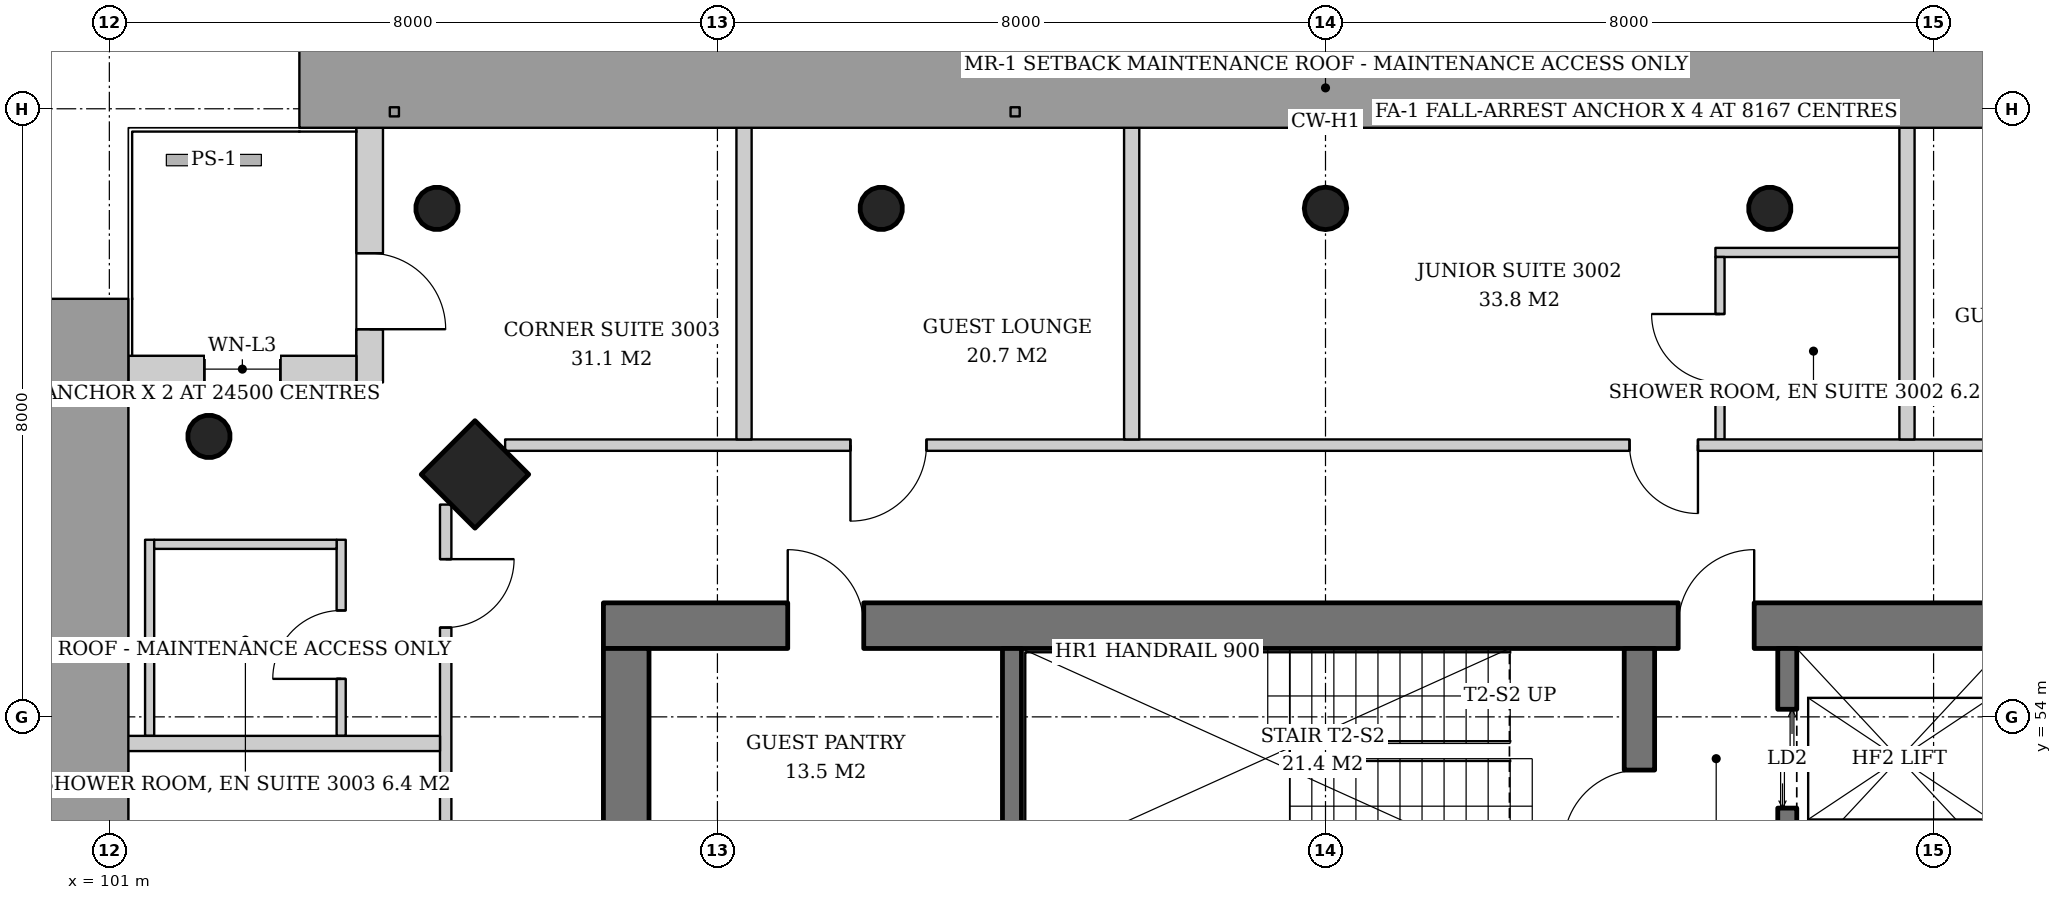
"""IFC4 building model, lengths in metres.
Left out: names, types, materials, properties, quantities, classifications, styles, units other than length and angle.
Written with IfcOpenShell. Run it as: python <this file> out.ifc"""

import sys

from ifc_helpers import new_model, si_unit, direction, frame, frame_2d, origin, origin_2d, place, context, subcontext, project, spatial, rectangle, hollow_circle, extrude, element, fill, save


model = new_model("IFC4")
c1 = context("Model", 3, precision=1e-05, world=origin(), true_north=direction((0.0, 1.0)))
c2 = subcontext(c1, "Body", "Model", "MODEL_VIEW")
j1 = project(units=[si_unit("LENGTHUNIT", "METRE"), si_unit("PLANEANGLEUNIT", "RADIAN")], contexts=[c1])
p1 = place(None, origin())
s1 = spatial("IfcSite", under=j1, at=p1, CompositionType="ELEMENT")
p2 = place(p1, origin())
s2 = spatial("IfcBuilding", under=s1, at=p2, CompositionType="ELEMENT")
p3 = place(p2, frame((0.0, 0.0, 119.8)))
s3 = spatial("IfcBuildingStorey", under=s2, at=p3, CompositionType="ELEMENT", Elevation=119.8)
p4 = place(p3, frame((105.759, 57.241, 0.0), z_axis=(0.043029647111, -0.043029647111, 0.998146732169), x_axis=(0.707106781187, 0.707106781187, 0.0)))
e1 = element("IfcColumn", 1, at=p4, inside=s3, PredefinedType="COLUMN", context=c2, shape_type="SweptSolid", body=[
    extrude(rectangle(XDim=1.0, YDim=1.0, at=origin_2d()), origin(), (0.0, 0.0, 1.0), 3.807),
])
p5 = place(p3, frame((105.259, 60.741, 0.0), z_axis=(0.043029647111, -0.043029647111, 0.998146732169), x_axis=(0.707106781187, 0.707106781187, 0.0)))
e2 = element("IfcColumn", 2, at=p5, inside=s3, PredefinedType="COLUMN", context=c2, shape_type="SweptSolid", body=[
    extrude(hollow_circle(Radius=0.28, WallThickness=0.02, at=origin_2d()), origin(), (0.0, 0.0, 1.0), 3.807),
])
p6 = place(p3, frame((122.871, 60.741, 0.0), z_axis=(-0.021497706284, -0.043059584825, 0.998841188968), x_axis=(0.894693706707, -0.446680166538, 0.0)))
e3 = element("IfcColumn", 3, at=p6, inside=s3, PredefinedType="COLUMN", context=c2, shape_type="SweptSolid", body=[
    extrude(hollow_circle(Radius=0.28, WallThickness=0.02, at=origin_2d()), origin(), (0.0, 0.0, 1.0), 3.804),
])
p7 = place(p3, frame((117.0, 60.741, 0.0), z_axis=(0.0, -0.043069538298, 0.999072076915), x_axis=(1.0, 0.0, 0.0)))
e4 = element("IfcColumn", 4, at=p7, inside=s3, PredefinedType="COLUMN", context=c2, shape_type="SweptSolid", body=[
    extrude(hollow_circle(Radius=0.28, WallThickness=0.02, at=origin_2d()), origin(), (0.0, 0.0, 1.0), 3.803),
])
p8 = place(p3, frame((111.129, 60.741, 0.0), z_axis=(0.021497706284, -0.043059584825, 0.998841188968), x_axis=(0.894693706707, 0.446680166538, 0.0)))
e5 = element("IfcColumn", 5, at=p8, inside=s3, PredefinedType="COLUMN", context=c2, shape_type="SweptSolid", body=[
    extrude(hollow_circle(Radius=0.28, WallThickness=0.02, at=origin_2d()), origin(), (0.0, 0.0, 1.0), 3.804),
])
p9 = place(p3, frame((102.259, 57.741, 0.0), z_axis=(0.043029647111, -0.043029647111, 0.998146732169), x_axis=(0.707106781187, 0.707106781187, 0.0)))
e6 = element("IfcColumn", 6, at=p9, inside=s3, PredefinedType="COLUMN", context=c2, shape_type="SweptSolid", body=[
    extrude(hollow_circle(Radius=0.28, WallThickness=0.02, at=origin_2d()), origin(), (0.0, 0.0, 1.0), 3.807),
])
p10 = place(p3, frame((107.5, 55.2, 0.0), z_axis=(0.0, 0.0, 1.0), x_axis=(1.0, 0.0, 0.0)))
e7 = element("IfcWall", 7, at=p10, inside=s3, PredefinedType="SHEAR", context=c2, shape_type="SweptSolid", body=[
    extrude(rectangle(XDim=19.0, YDim=0.6, at=frame_2d((9.5, 0.0))), origin(), (0.0, 0.0, 1.0), 3.8),
])
p11 = place(p10, frame((14.14, 0.0, 0.0)))
e8 = element("IfcOpeningElement", 8, at=p11, cuts=e7, PredefinedType="OPENING", context=c2, shape_type="SweptSolid", body=[
    extrude(rectangle(XDim=1.0, YDim=2.1, at=frame_2d((0.5, 1.05))), frame((0.0, 0.31, 0.0), z_axis=(0.0, -1.0, 0.0), x_axis=(1.0, 0.0, 0.0)), (0.0, 0.0, 1.0), 0.62),
])
p12 = place(p10, frame((2.425, 0.0, 0.0)))
e9 = element("IfcOpeningElement", 9, at=p12, cuts=e7, PredefinedType="OPENING", context=c2, shape_type="SweptSolid", body=[
    extrude(rectangle(XDim=1.0, YDim=2.1, at=frame_2d((0.5, 1.05))), frame((0.0, 0.31, 0.0), z_axis=(0.0, -1.0, 0.0), x_axis=(1.0, 0.0, 0.0)), (0.0, 0.0, 1.0), 0.62),
])
p13 = place(p3, frame((107.8, 37.1, 0.0), z_axis=(0.0, 0.0, 1.0), x_axis=(0.0, 1.0, 0.0)))
e10 = element("IfcWall", 10, at=p13, inside=s3, PredefinedType="SHEAR", context=c2, shape_type="SweptSolid", body=[
    extrude(rectangle(XDim=17.8, YDim=0.6, at=frame_2d((8.9, 0.0))), origin(), (0.0, 0.0, 1.0), 3.8),
])
p14 = place(p13, frame((8.0, 0.0, 0.0)))
e11 = element("IfcOpeningElement", 11, at=p14, cuts=e10, PredefinedType="OPENING", context=c2, shape_type="SweptSolid", body=[
    extrude(rectangle(XDim=1.8, YDim=2.4, at=frame_2d((0.9, 1.2))), frame((0.0, 0.31, 0.0), z_axis=(0.0, -1.0, 0.0), x_axis=(1.0, 0.0, 0.0)), (0.0, 0.0, 1.0), 0.62),
])
p15 = place(p3, frame((121.13, 52.0, 0.0), z_axis=(0.0, 0.0, 1.0), x_axis=(0.0, 1.0, 0.0)))
e12 = element("IfcWall", 12, at=p15, inside=s3, PredefinedType="SHEAR", context=c2, shape_type="SweptSolid", body=[
    extrude(rectangle(XDim=2.9, YDim=0.4, at=frame_2d((1.45, 0.0))), origin(), (0.0, 0.0, 1.0), 3.8),
])
p16 = place(p15, frame((0.3, 0.0, 0.0)))
e13 = element("IfcOpeningElement", 13, at=p16, cuts=e12, PredefinedType="OPENING", context=c2, shape_type="SweptSolid", body=[
    extrude(rectangle(XDim=1.0, YDim=2.1, at=frame_2d((0.5, 1.05))), frame((0.0, 0.21, 0.0), z_axis=(0.0, -1.0, 0.0), x_axis=(1.0, 0.0, 0.0)), (0.0, 0.0, 1.0), 0.42),
])
p17 = place(p3, frame((104.425, 61.75, 0.0), z_axis=(0.0, 0.0, 1.0), x_axis=(0.0, -1.0, 0.0)))
e14 = element("IfcWall", 14, at=p17, inside=s3, PredefinedType="SOLIDWALL", context=c2, shape_type="SweptSolid", body=[
    extrude(rectangle(XDim=3.35, YDim=0.35, at=frame_2d((1.675, 0.0))), origin(), (0.0, 0.0, 1.0), 3.6),
])
p18 = place(p17, frame((1.65, 0.0, 0.0)))
e15 = element("IfcOpeningElement", 15, at=p18, cuts=e14, PredefinedType="OPENING", context=c2, shape_type="SweptSolid", body=[
    extrude(rectangle(XDim=1.0, YDim=2.4, at=frame_2d((0.5, 1.2))), frame((0.0, 0.185, 0.0), z_axis=(0.0, -1.0, 0.0), x_axis=(1.0, 0.0, 0.0)), (0.0, 0.0, 1.0), 0.37),
])
p19 = place(p3, frame((104.25, 58.575, 0.0), z_axis=(0.0, 0.0, 1.0), x_axis=(-1.0, 0.0, 0.0)))
e16 = element("IfcWall", 16, at=p19, inside=s3, PredefinedType="SOLIDWALL", context=c2, shape_type="SweptSolid", body=[
    extrude(rectangle(XDim=3.0, YDim=0.35, at=frame_2d((1.5, 0.0))), origin(), (0.0, 0.0, 1.0), 3.6),
])
p20 = place(p19, frame((1.0, 0.0, 0.9)))
e17 = element("IfcOpeningElement", 17, at=p20, cuts=e16, PredefinedType="OPENING", context=c2, shape_type="SweptSolid", body=[
    extrude(rectangle(XDim=1.0, YDim=2.4, at=frame_2d((0.5, 1.2))), frame((0.0, 0.185, 0.0), z_axis=(0.0, -1.0, 0.0), x_axis=(1.0, 0.0, 0.0)), (0.0, 0.0, 1.0), 0.37),
])
p21 = place(p3, frame((112.875, 52.0, 0.0), z_axis=(0.0, 0.0, 1.0), x_axis=(0.0, 1.0, 0.0)))
e18 = element("IfcWall", 18, at=p21, inside=s3, PredefinedType="SHEAR", context=c2, shape_type="SweptSolid", body=[
    extrude(rectangle(XDim=2.9, YDim=0.25, at=frame_2d((1.45, 0.0))), origin(), (0.0, 0.0, 1.0), 3.8),
])
p22 = place(p3, frame((123.075, 52.0, 0.0), z_axis=(0.0, 0.0, 1.0), x_axis=(0.0, 1.0, 0.0)))
e19 = element("IfcWall", 19, at=p22, inside=s3, PredefinedType="SHEAR", context=c2, shape_type="SweptSolid", body=[
    extrude(rectangle(XDim=2.9, YDim=0.25, at=frame_2d((1.45, 0.0))), origin(), (0.0, 0.0, 1.0), 3.8),
])
p23 = place(p22, frame((0.8, 0.0, 0.0)))
e20 = element("IfcOpeningElement", 20, at=p23, cuts=e19, PredefinedType="OPENING", context=c2, shape_type="SweptSolid", body=[
    extrude(rectangle(XDim=1.3, YDim=2.2, at=frame_2d((0.65, 1.1))), frame((0.0, 0.135, 0.0), z_axis=(0.0, -1.0, 0.0), x_axis=(1.0, 0.0, 0.0)), (0.0, 0.0, 1.0), 0.27),
])
p24 = place(p3, frame((124.55, 60.11, 0.0), z_axis=(0.0, 0.0, 1.0), x_axis=(-1.0, 0.0, 0.0)))
e21 = element("IfcWall", 21, at=p24, inside=s3, PredefinedType="PARTITIONING", context=c2, shape_type="SweptSolid", body=[
    extrude(rectangle(XDim=2.42, YDim=0.12, at=frame_2d((1.21, 0.0))), origin(), (0.0, 0.0, 1.0), 3.0),
])
p25 = place(p3, frame((122.19, 57.65, 0.0), z_axis=(0.0, 0.0, 1.0), x_axis=(0.0, 1.0, 0.0)))
e22 = element("IfcWall", 22, at=p25, inside=s3, PredefinedType="PARTITIONING", context=c2, shape_type="SweptSolid", body=[
    extrude(rectangle(XDim=2.4, YDim=0.12, at=frame_2d((1.2, 0.0))), origin(), (0.0, 0.0, 1.0), 3.0),
])
p26 = place(p25, frame((0.75, 0.0, 0.0)))
e23 = element("IfcOpeningElement", 23, at=p26, cuts=e22, PredefinedType="OPENING", context=c2, shape_type="SweptSolid", body=[
    extrude(rectangle(XDim=0.9, YDim=2.1, at=frame_2d((0.45, 1.05))), frame((0.0, 0.07, 0.0), z_axis=(0.0, -1.0, 0.0), x_axis=(1.0, 0.0, 0.0)), (0.0, 0.0, 1.0), 0.14),
])
p27 = place(p3, frame((127.793, 57.575, 0.0), z_axis=(0.0, 0.0, 1.0), x_axis=(-1.0, 0.0, 0.0)))
e24 = element("IfcWall", 24, at=p27, inside=s3, PredefinedType="PARTITIONING", context=c2, shape_type="SweptSolid", body=[
    extrude(rectangle(XDim=21.586, YDim=0.15, at=frame_2d((10.793, 0.0))), origin(), (0.0, 0.0, 1.0), 2.9),
])
p28 = place(p27, frame((0.668, 0.0, 0.0)))
e25 = element("IfcOpeningElement", 25, at=p28, cuts=e24, PredefinedType="OPENING", context=c2, shape_type="SweptSolid", body=[
    extrude(rectangle(XDim=1.0, YDim=2.1, at=frame_2d((0.5, 1.05))), frame((0.0, 0.085, 0.0), z_axis=(0.0, -1.0, 0.0), x_axis=(1.0, 0.0, 0.0)), (0.0, 0.0, 1.0), 0.17),
])
p29 = place(p27, frame((5.893, 0.0, 0.0)))
e26 = element("IfcOpeningElement", 26, at=p29, cuts=e24, PredefinedType="OPENING", context=c2, shape_type="SweptSolid", body=[
    extrude(rectangle(XDim=0.9, YDim=2.1, at=frame_2d((0.45, 1.05))), frame((0.0, 0.085, 0.0), z_axis=(0.0, -1.0, 0.0), x_axis=(1.0, 0.0, 0.0)), (0.0, 0.0, 1.0), 0.17),
])
p30 = place(p27, frame((16.043, 0.0, 0.0)))
e27 = element("IfcOpeningElement", 27, at=p30, cuts=e24, PredefinedType="OPENING", context=c2, shape_type="SweptSolid", body=[
    extrude(rectangle(XDim=1.0, YDim=2.1, at=frame_2d((0.5, 1.05))), frame((0.0, 0.085, 0.0), z_axis=(0.0, -1.0, 0.0), x_axis=(1.0, 0.0, 0.0)), (0.0, 0.0, 1.0), 0.17),
])
p31 = place(p3, frame((124.65, 57.65, 0.0), z_axis=(0.0, 0.0, 1.0), x_axis=(0.0, 1.0, 0.0)))
e28 = element("IfcWall", 28, at=p31, inside=s3, PredefinedType="PARTITIONING", context=c2, shape_type="SweptSolid", body=[
    extrude(rectangle(XDim=4.14, YDim=0.2, at=frame_2d((2.07, 0.0))), origin(), (0.0, 0.0, 1.0), 3.2),
])
p32 = place(p3, frame((114.45, 57.65, 0.0), z_axis=(0.0, 0.0, 1.0), x_axis=(0.0, 1.0, 0.0)))
e29 = element("IfcWall", 29, at=p32, inside=s3, PredefinedType="PARTITIONING", context=c2, shape_type="SweptSolid", body=[
    extrude(rectangle(XDim=4.14, YDim=0.2, at=frame_2d((2.07, 0.0))), origin(), (0.0, 0.0, 1.0), 3.0),
])
p33 = place(p3, frame((109.35, 57.65, 0.0), z_axis=(0.0, 0.0, 1.0), x_axis=(0.0, 1.0, 0.0)))
e30 = element("IfcWall", 30, at=p33, inside=s3, PredefinedType="PARTITIONING", context=c2, shape_type="SweptSolid", body=[
    extrude(rectangle(XDim=4.14, YDim=0.2, at=frame_2d((2.07, 0.0))), origin(), (0.0, 0.0, 1.0), 3.2),
])
p34 = place(p3, frame((104.05, 53.75, 0.0), z_axis=(0.0, 0.0, 1.0), x_axis=(0.0, 1.0, 0.0)))
e31 = element("IfcWall", 31, at=p34, inside=s3, PredefinedType="PARTITIONING", context=c2, shape_type="SweptSolid", body=[
    extrude(rectangle(XDim=2.58, YDim=0.12, at=frame_2d((1.29, 0.0))), origin(), (0.0, 0.0, 1.0), 2.9),
])
p35 = place(p34, frame((0.75, 0.0, 0.0)))
e32 = element("IfcOpeningElement", 32, at=p35, cuts=e31, PredefinedType="OPENING", context=c2, shape_type="SweptSolid", body=[
    extrude(rectangle(XDim=0.9, YDim=2.1, at=frame_2d((0.45, 1.05))), frame((0.0, 0.07, 0.0), z_axis=(0.0, -1.0, 0.0), x_axis=(1.0, 0.0, 0.0)), (0.0, 0.0, 1.0), 0.14),
])
p36 = place(p3, frame((101.53, 53.75, 0.0), z_axis=(0.0, 0.0, 1.0), x_axis=(0.0, 1.0, 0.0)))
e33 = element("IfcWall", 33, at=p36, inside=s3, PredefinedType="PARTITIONING", context=c2, shape_type="SweptSolid", body=[
    extrude(rectangle(XDim=2.58, YDim=0.12, at=frame_2d((1.29, 0.0))), origin(), (0.0, 0.0, 1.0), 3.6),
])
p37 = place(p3, frame((103.99, 56.27, 0.0), z_axis=(0.0, 0.0, 1.0), x_axis=(-1.0, 0.0, 0.0)))
e34 = element("IfcWall", 34, at=p37, inside=s3, PredefinedType="PARTITIONING", context=c2, shape_type="SweptSolid", body=[
    extrude(rectangle(XDim=2.4, YDim=0.12, at=frame_2d((1.2, 0.0))), origin(), (0.0, 0.0, 1.0), 3.2),
])
p38 = place(p3, frame((105.425, 56.793, 0.0), z_axis=(0.0, 0.0, 1.0), x_axis=(0.0, -1.0, 0.0)))
e35 = element("IfcWall", 35, at=p38, inside=s3, PredefinedType="PARTITIONING", context=c2, shape_type="SweptSolid", body=[
    extrude(rectangle(XDim=21.586, YDim=0.15, at=frame_2d((10.793, 0.0))), origin(), (0.0, 0.0, 1.0), 2.9),
])
p39 = place(p38, frame((0.718, 0.0, 0.0)))
e36 = element("IfcOpeningElement", 36, at=p39, cuts=e35, PredefinedType="OPENING", context=c2, shape_type="SweptSolid", body=[
    extrude(rectangle(XDim=0.9, YDim=2.1, at=frame_2d((0.45, 1.05))), frame((0.0, 0.085, 0.0), z_axis=(0.0, -1.0, 0.0), x_axis=(1.0, 0.0, 0.0)), (0.0, 0.0, 1.0), 0.17),
])
p40 = place(p38, frame((5.843, 0.0, 0.0)))
e37 = element("IfcOpeningElement", 37, at=p40, cuts=e35, PredefinedType="OPENING", context=c2, shape_type="SweptSolid", body=[
    extrude(rectangle(XDim=1.0, YDim=2.1, at=frame_2d((0.5, 1.05))), frame((0.0, 0.085, 0.0), z_axis=(0.0, -1.0, 0.0), x_axis=(1.0, 0.0, 0.0)), (0.0, 0.0, 1.0), 0.17),
])
p41 = place(p38, frame((10.993, 0.0, 0.0)))
e38 = element("IfcOpeningElement", 38, at=p41, cuts=e35, PredefinedType="OPENING", context=c2, shape_type="SweptSolid", body=[
    extrude(rectangle(XDim=0.9, YDim=2.1, at=frame_2d((0.45, 1.05))), frame((0.0, 0.085, 0.0), z_axis=(0.0, -1.0, 0.0), x_axis=(1.0, 0.0, 0.0)), (0.0, 0.0, 1.0), 0.17),
])
p42 = place(p3, frame((105.35, 53.65, 0.0), z_axis=(0.0, 0.0, 1.0), x_axis=(-1.0, 0.0, 0.0)))
e39 = element("IfcWall", 39, at=p42, inside=s3, PredefinedType="PARTITIONING", context=c2, shape_type="SweptSolid", body=[
    extrude(rectangle(XDim=4.14, YDim=0.2, at=frame_2d((2.07, 0.0))), origin(), (0.0, 0.0, 1.0), 3.2),
])
p43 = place(p18, origin())
e40 = element("IfcDoor", 40, at=p43, inside=s3, OperationType="SINGLE_SWING_RIGHT", PredefinedType="DOOR", context=c2, shape_type="SweptSolid", body=[
    extrude(rectangle(XDim=1.0, YDim=2.4, at=frame_2d((0.5, 1.2))), frame((0.0, 0.025, 0.0), z_axis=(0.0, -1.0, 0.0), x_axis=(1.0, 0.0, 0.0)), (0.0, 0.0, 1.0), 0.05),
])
fill(e15, e40)
p44 = place(p20, origin())
e41 = element("IfcWindow", 41, at=p44, inside=s3, PartitioningType="SINGLE_PANEL", PredefinedType="WINDOW", context=c2, shape_type="SweptSolid", body=[
    extrude(rectangle(XDim=1.0, YDim=2.4, at=frame_2d((0.5, 1.2))), frame((0.0, 0.03, 0.0), z_axis=(0.0, -1.0, 0.0), x_axis=(1.0, 0.0, 0.0)), (0.0, 0.0, 1.0), 0.06),
])
fill(e17, e41)
p45 = place(p23, origin())
e42 = element("IfcDoor", 42, at=p45, inside=s3, OperationType="DOUBLE_DOOR_SLIDING", PredefinedType="DOOR", context=c2, shape_type="SweptSolid", body=[
    extrude(rectangle(XDim=1.3, YDim=2.2, at=frame_2d((0.65, 1.1))), frame((0.0, 0.025, 0.0), z_axis=(0.0, -1.0, 0.0), x_axis=(1.0, 0.0, 0.0)), (0.0, 0.0, 1.0), 0.05),
])
fill(e20, e42)
p46 = place(p16, origin())
e43 = element("IfcDoor", 43, at=p46, inside=s3, OperationType="SINGLE_SWING_LEFT", PredefinedType="DOOR", context=c2, shape_type="SweptSolid", body=[
    extrude(rectangle(XDim=1.0, YDim=2.1, at=frame_2d((0.5, 1.05))), frame((0.0, 0.025, 0.0), z_axis=(0.0, -1.0, 0.0), x_axis=(1.0, 0.0, 0.0)), (0.0, 0.0, 1.0), 0.05),
])
fill(e13, e43)
p47 = place(p11, origin())
e44 = element("IfcDoor", 44, at=p47, inside=s3, OperationType="SINGLE_SWING_RIGHT", PredefinedType="DOOR", context=c2, shape_type="SweptSolid", body=[
    extrude(rectangle(XDim=1.0, YDim=2.1, at=frame_2d((0.5, 1.05))), frame((0.0, 0.025, 0.0), z_axis=(0.0, -1.0, 0.0), x_axis=(1.0, 0.0, 0.0)), (0.0, 0.0, 1.0), 0.05),
])
fill(e8, e44)
p48 = place(p12, origin())
e45 = element("IfcDoor", 45, at=p48, inside=s3, OperationType="SINGLE_SWING_LEFT", PredefinedType="DOOR", context=c2, shape_type="SweptSolid", body=[
    extrude(rectangle(XDim=1.0, YDim=2.1, at=frame_2d((0.5, 1.05))), frame((0.0, -0.24, 0.0), z_axis=(0.0, -1.0, 0.0), x_axis=(1.0, 0.0, 0.0)), (0.0, 0.0, 1.0), 0.05),
])
fill(e9, e45)
p49 = place(p26, origin())
e46 = element("IfcDoor", 46, at=p49, inside=s3, OperationType="SINGLE_SWING_RIGHT", PredefinedType="DOOR", context=c2, shape_type="SweptSolid", body=[
    extrude(rectangle(XDim=0.9, YDim=2.1, at=frame_2d((0.45, 1.05))), frame((0.0, 0.025, 0.0), z_axis=(0.0, -1.0, 0.0), x_axis=(1.0, 0.0, 0.0)), (0.0, 0.0, 1.0), 0.05),
])
fill(e23, e46)
p50 = place(p29, origin())
e47 = element("IfcDoor", 47, at=p50, inside=s3, OperationType="SINGLE_SWING_LEFT", PredefinedType="DOOR", context=c2, shape_type="SweptSolid", body=[
    extrude(rectangle(XDim=0.9, YDim=2.1, at=frame_2d((0.45, 1.05))), frame((0.0, 0.025, 0.0), z_axis=(0.0, -1.0, 0.0), x_axis=(1.0, 0.0, 0.0)), (0.0, 0.0, 1.0), 0.05),
])
fill(e26, e47)
p51 = place(p30, origin())
e48 = element("IfcDoor", 48, at=p51, inside=s3, OperationType="SINGLE_SWING_RIGHT", PredefinedType="DOOR", context=c2, shape_type="SweptSolid", body=[
    extrude(rectangle(XDim=1.0, YDim=2.1, at=frame_2d((0.5, 1.05))), frame((0.0, 0.025, 0.0), z_axis=(0.0, -1.0, 0.0), x_axis=(1.0, 0.0, 0.0)), (0.0, 0.0, 1.0), 0.05),
])
fill(e27, e48)
p52 = place(p35, origin())
e49 = element("IfcDoor", 49, at=p52, inside=s3, OperationType="SINGLE_SWING_LEFT", PredefinedType="DOOR", context=c2, shape_type="SweptSolid", body=[
    extrude(rectangle(XDim=0.9, YDim=2.1, at=frame_2d((0.45, 1.05))), frame((0.0, 0.025, 0.0), z_axis=(0.0, -1.0, 0.0), x_axis=(1.0, 0.0, 0.0)), (0.0, 0.0, 1.0), 0.05),
])
fill(e32, e49)
p53 = place(p39, origin())
e50 = element("IfcDoor", 50, at=p53, inside=s3, OperationType="SINGLE_SWING_LEFT", PredefinedType="DOOR", context=c2, shape_type="SweptSolid", body=[
    extrude(rectangle(XDim=0.9, YDim=2.1, at=frame_2d((0.45, 1.05))), frame((0.0, 0.025, 0.0), z_axis=(0.0, -1.0, 0.0), x_axis=(1.0, 0.0, 0.0)), (0.0, 0.0, 1.0), 0.05),
])
fill(e36, e50)
save(model, sys.argv[1])
